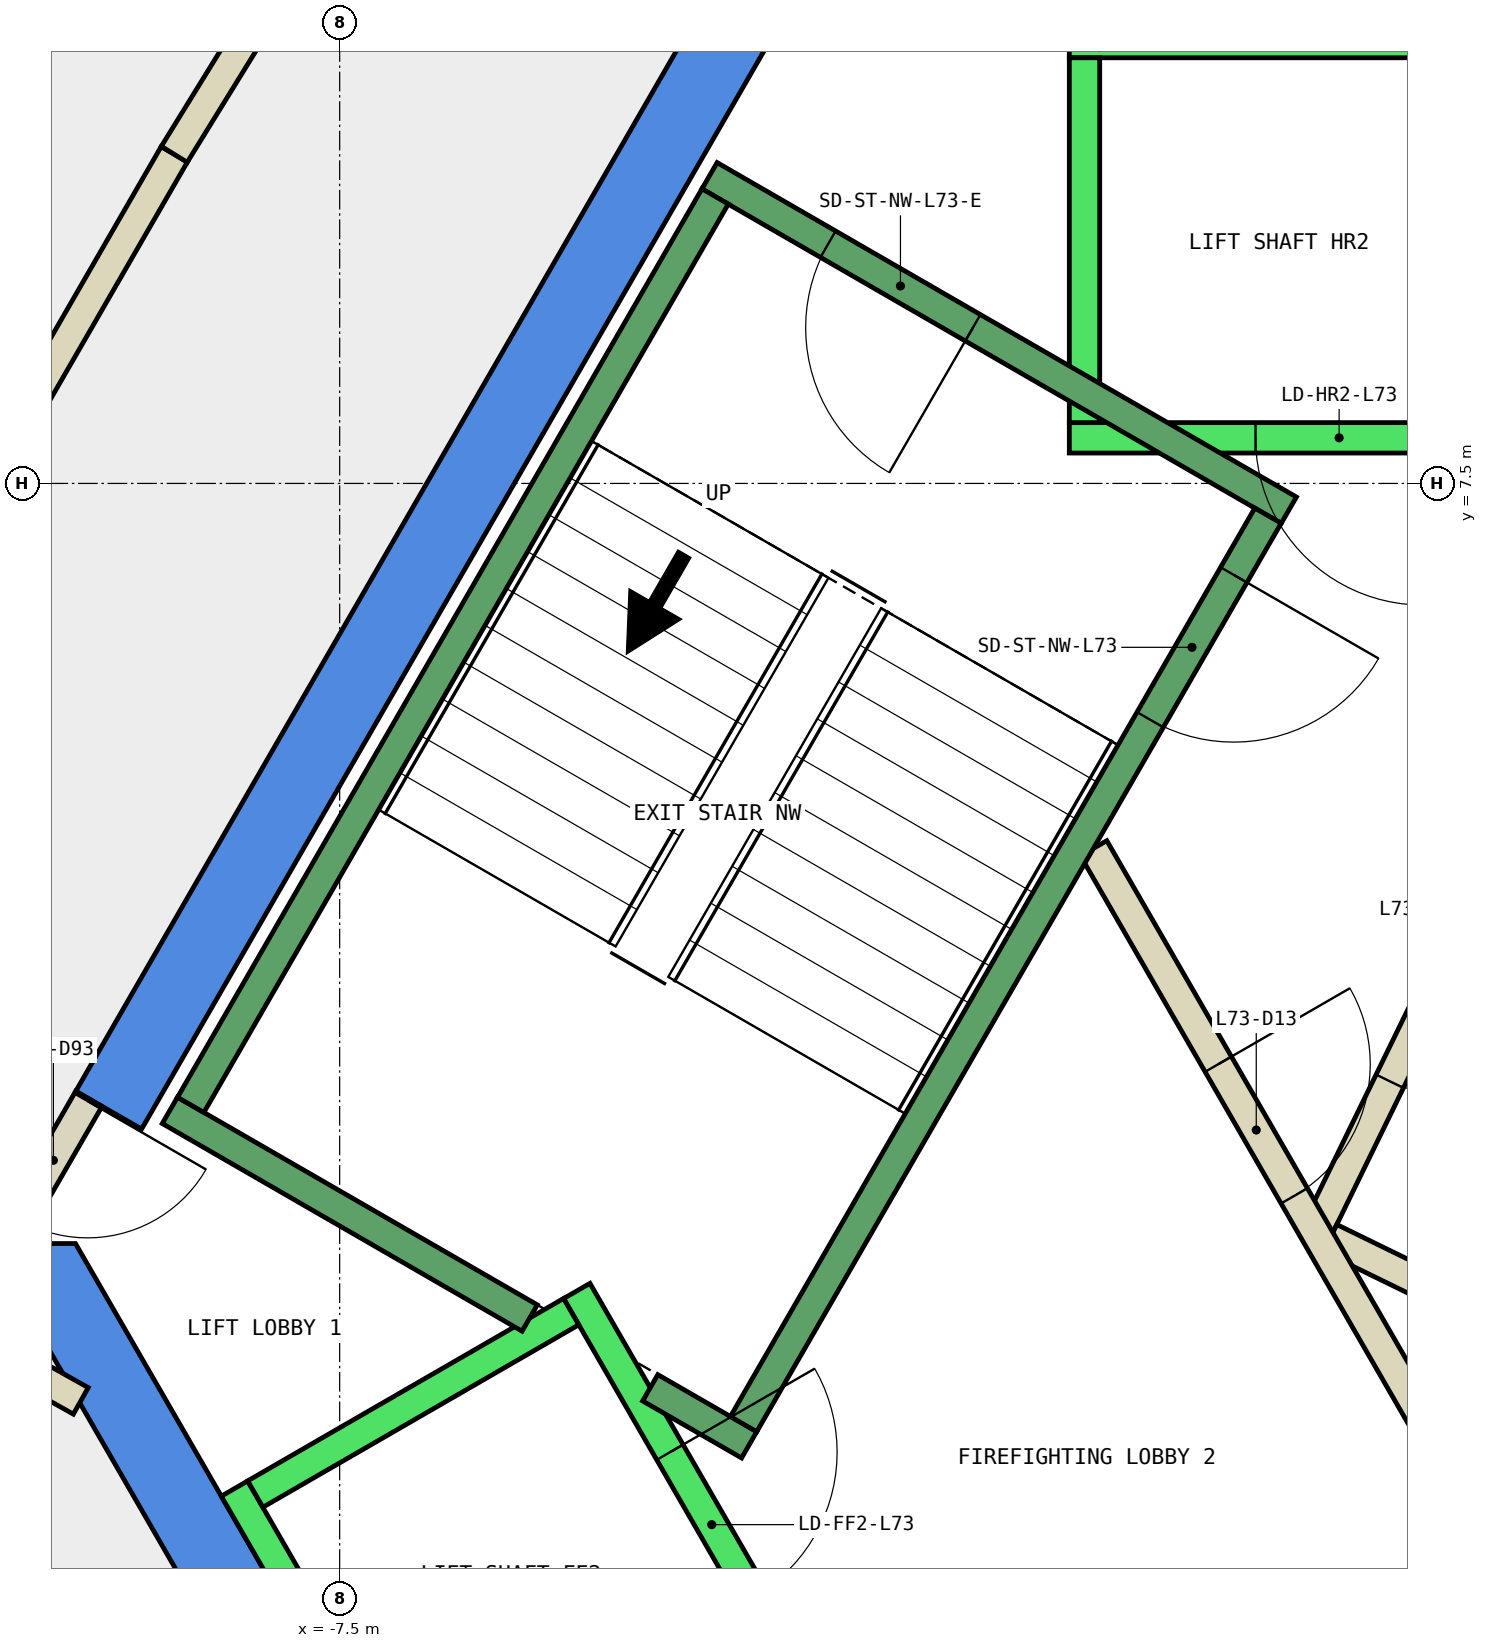
"""IFC4 building model, lengths in metres.
Left out: names, types, materials, properties, quantities, classifications, styles, units other than length and angle.
Written with IfcOpenShell. Run it as: python <this file> out.ifc"""

import sys

from ifc_helpers import new_model, si_unit, direction, frame, frame_2d, origin, place, context, subcontext, project, spatial, polyline, rectangle, outline, extrude, element, fill, save


model = new_model("IFC4")
c1 = context("Model", 3, precision=1e-05, world=origin(), true_north=direction((0.0, 1.0)))
c2 = subcontext(c1, "Body", "Model", "MODEL_VIEW")
j1 = project(units=[si_unit("LENGTHUNIT", "METRE"), si_unit("PLANEANGLEUNIT", "RADIAN")], contexts=[c1])
p1 = place(None, origin())
s1 = spatial("IfcSite", under=j1, at=p1, CompositionType="ELEMENT")
p2 = place(p1, origin())
s2 = spatial("IfcBuilding", under=s1, at=p2, CompositionType="ELEMENT")
p3 = place(p2, frame((0.0, 0.0, 311.6)))
s3 = spatial("IfcBuildingStorey", under=s2, at=p3, CompositionType="ELEMENT", Elevation=311.6)
p4 = place(p3, frame((0.0, 0.0, -0.34)))
e1 = element("IfcWall", 1, at=p4, inside=s3, PredefinedType="SHEAR", context=c2, shape_type="SweptSolid", body=[
    extrude(outline(polyline([(-9.236, 3.502), (-8.803, 3.253), (-4.619, 10.5), (-4.907, 11.0), (-9.236, 3.502)])), origin(), (0.0, 0.0, 1.0), 3.6),
])
p5 = place(p3, frame((0.0, 0.0, -0.34)))
e2 = element("IfcWall", 2, at=p5, inside=s3, PredefinedType="SHEAR", context=c2, shape_type="SweptSolid", body=[
    extrude(outline(polyline([(-9.815, 2.5), (-4.907, -6.0), (-4.619, -5.5), (-9.238, 2.5), (-9.815, 2.5)])), origin(), (0.0, 0.0, 1.0), 3.6),
])
p6 = place(p3, frame((0.285, 5.365, 0.0), z_axis=(0.0, 0.0, 1.0), x_axis=(-0.43840190643, -0.898779043168, 0.0)))
e3 = element("IfcWall", 3, at=p6, inside=s3, PredefinedType="PARTITIONING", context=c2, shape_type="SweptSolid", body=[
    extrude(rectangle(XDim=3.1, YDim=0.2, at=frame_2d((1.55, 0.0))), origin(), (0.0, 0.0, 1.0), 3.26),
])
p7 = place(p6, frame((1.1, 0.0, 0.0)))
e4 = element("IfcOpeningElement", 4, at=p7, cuts=e3, PredefinedType="OPENING", context=c2, shape_type="SweptSolid", body=[
    extrude(rectangle(XDim=0.9, YDim=2.1, at=frame_2d((0.45, 1.05))), frame((0.0, 0.11, 0.0), z_axis=(0.0, -1.0, 0.0), x_axis=(1.0, 0.0, 0.0)), (0.0, 0.0, 1.0), 0.22),
])
p8 = place(p3, frame((-0.984, 2.535, 0.0), z_axis=(0.0, 0.0, 1.0), x_axis=(0.898707583217, -0.438548378025, 0.0)))
e5 = element("IfcWall", 5, at=p8, inside=s3, PredefinedType="PARTITIONING", context=c2, shape_type="SweptSolid", body=[
    extrude(rectangle(XDim=1.774, YDim=0.2, at=frame_2d((0.887, 0.0))), origin(), (0.0, 0.0, 1.0), 3.26),
])
p9 = place(p3, frame((-9.203, 1.465, 0.0), z_axis=(0.0, 0.0, 1.0), x_axis=(-0.872341127106, 0.488897696823, 0.0)))
e6 = element("IfcWall", 6, at=p9, inside=s3, PredefinedType="PARTITIONING", context=c2, shape_type="SweptSolid", body=[
    extrude(rectangle(XDim=1.667, YDim=0.2, at=frame_2d((0.833, 0.0))), origin(), (0.0, 0.0, 1.0), 3.26),
])
p10 = place(p3, frame((-12.701, 2.54, 0.0), z_axis=(0.0, 0.0, 1.0), x_axis=(0.499946799636, 0.86605611685, 0.0)))
e7 = element("IfcWall", 7, at=p10, inside=s3, PredefinedType="PARTITIONING", context=c2, shape_type="SweptSolid", body=[
    extrude(rectangle(XDim=8.227, YDim=0.2, at=frame_2d((4.114, 0.0))), origin(), (0.0, 0.0, 1.0), 3.26),
])
p11 = place(p10, frame((3.613, 0.0, 0.0)))
e8 = element("IfcOpeningElement", 8, at=p11, cuts=e7, PredefinedType="OPENING", context=c2, shape_type="SweptSolid", body=[
    extrude(rectangle(XDim=1.0, YDim=2.1, at=frame_2d((0.5, 1.05))), frame((0.0, 0.11, 0.0), z_axis=(0.0, -1.0, 0.0), x_axis=(1.0, 0.0, 0.0)), (0.0, 0.0, 1.0), 0.22),
])
p12 = place(p3, frame((-8.588, 9.665, 0.0), z_axis=(0.0, 0.0, 1.0), x_axis=(0.525142215688, 0.851014484778, 0.0)))
e9 = element("IfcWall", 9, at=p12, inside=s3, PredefinedType="PARTITIONING", context=c2, shape_type="SweptSolid", body=[
    extrude(rectangle(XDim=7.872, YDim=0.2, at=frame_2d((3.936, 0.0))), origin(), (0.0, 0.0, 1.0), 3.26),
])
p13 = place(p3, frame((-0.982, -1.0, 0.0), z_axis=(0.0, 0.0, 1.0), x_axis=(0.50024047865, 0.865886518847, 0.0)))
e10 = element("IfcWall", 10, at=p13, inside=s3, PredefinedType="PARTITIONING", context=c2, shape_type="SweptSolid", body=[
    extrude(rectangle(XDim=1.863, YDim=0.2, at=frame_2d((0.931, 0.0))), origin(), (0.0, 0.0, 1.0), 3.26),
])
p14 = place(p3, frame((-2.54, 5.1, 0.0), z_axis=(0.0, 0.0, 1.0), x_axis=(0.499925051871, -0.866068670783, 0.0)))
e11 = element("IfcWall", 11, at=p14, inside=s3, PredefinedType="PARTITIONING", context=c2, shape_type="SweptSolid", body=[
    extrude(rectangle(XDim=5.181, YDim=0.2, at=frame_2d((2.59, 0.0))), origin(), (0.0, 0.0, 1.0), 3.26),
])
p15 = place(p14, frame((1.64, 0.0, 0.0)))
e12 = element("IfcOpeningElement", 12, at=p15, cuts=e11, PredefinedType="OPENING", context=c2, shape_type="SweptSolid", body=[
    extrude(rectangle(XDim=1.0, YDim=2.1, at=frame_2d((0.5, 1.05))), frame((0.0, 0.11, 0.0), z_axis=(0.0, -1.0, 0.0), x_axis=(1.0, 0.0, 0.0)), (0.0, 0.0, 1.0), 0.22),
])
p16 = place(p3, frame((-9.15, 3.452, 0.0), z_axis=(0.0, 0.0, 1.0), x_axis=(-0.500079945886, -0.865979242085, 0.0)))
e13 = element("IfcWall", 13, at=p16, inside=s3, PredefinedType="PARTITIONING", context=c2, shape_type="SweptSolid", body=[
    extrude(rectangle(XDim=0.926, YDim=0.2, at=frame_2d((0.463, 0.0))), origin(), (0.0, 0.0, 1.0), 2.4),
])
p17 = place(p16, frame((0.017, 0.0, 0.0)))
e14 = element("IfcOpeningElement", 14, at=p17, cuts=e13, PredefinedType="OPENING", context=c2, shape_type="SweptSolid", body=[
    extrude(rectangle(XDim=0.9, YDim=2.1, at=frame_2d((0.45, 1.05))), frame((0.0, 0.11, 0.0), z_axis=(0.0, -1.0, 0.0), x_axis=(1.0, 0.0, 0.0)), (0.0, 0.0, 1.0), 0.22),
])
p18 = place(p3, frame((2.7, 7.8, 0.0), z_axis=(0.0, 0.0, 1.0), x_axis=(-1.0, 0.0, 0.0)))
e15 = element("IfcWall", 15, at=p18, inside=s3, PredefinedType="STANDARD", context=c2, shape_type="SweptSolid", body=[
    extrude(rectangle(XDim=5.4, YDim=0.2, at=frame_2d((2.7, 0.0))), origin(), (0.0, 0.0, 1.0), 3.26),
])
p19 = place(p18, frame((1.225, 0.0, 0.0)))
e16 = element("IfcOpeningElement", 16, at=p19, cuts=e15, PredefinedType="OPENING", context=c2, shape_type="SweptSolid", body=[
    extrude(rectangle(XDim=1.1, YDim=2.1, at=frame_2d((0.55, 1.05))), frame((0.0, 0.11, 0.0), z_axis=(0.0, -1.0, 0.0), x_axis=(1.0, 0.0, 0.0)), (0.0, 0.0, 1.0), 0.22),
])
p20 = place(p18, frame((3.075, 0.0, 0.0)))
e17 = element("IfcOpeningElement", 17, at=p20, cuts=e15, PredefinedType="OPENING", context=c2, shape_type="SweptSolid", body=[
    extrude(rectangle(XDim=1.1, YDim=2.1, at=frame_2d((0.55, 1.05))), frame((0.0, 0.11, 0.0), z_axis=(0.0, -1.0, 0.0), x_axis=(1.0, 0.0, 0.0)), (0.0, 0.0, 1.0), 0.22),
])
p21 = place(p3, frame((2.7, 10.4, 0.0), z_axis=(0.0, 0.0, 1.0), x_axis=(-1.0, 0.0, 0.0)))
e18 = element("IfcWall", 18, at=p21, inside=s3, PredefinedType="STANDARD", context=c2, shape_type="SweptSolid", body=[
    extrude(rectangle(XDim=5.4, YDim=0.2, at=frame_2d((2.7, 0.0))), origin(), (0.0, 0.0, 1.0), 3.26),
])
p22 = place(p3, frame((-2.6, 7.9, 0.0), z_axis=(0.0, 0.0, 1.0), x_axis=(0.0, 1.0, 0.0)))
e19 = element("IfcWall", 19, at=p22, inside=s3, PredefinedType="STANDARD", context=c2, shape_type="SweptSolid", body=[
    extrude(rectangle(XDim=2.4, YDim=0.2, at=frame_2d((1.2, 0.0))), origin(), (0.0, 0.0, 1.0), 3.26),
])
p23 = place(p3, frame((-5.94, 2.188, 0.0), z_axis=(0.0, 0.0, 1.0), x_axis=(0.500034260056, -0.866005622828, 0.0)))
e20 = element("IfcWall", 20, at=p23, inside=s3, PredefinedType="STANDARD", context=c2, shape_type="SweptSolid", body=[
    extrude(rectangle(XDim=5.399, YDim=0.2, at=frame_2d((2.7, 0.0))), origin(), (0.0, 0.0, 1.0), 3.26),
])
p24 = place(p23, frame((3.075, 0.0, 0.0)))
e21 = element("IfcOpeningElement", 21, at=p24, cuts=e20, PredefinedType="OPENING", context=c2, shape_type="SweptSolid", body=[
    extrude(rectangle(XDim=1.1, YDim=2.1, at=frame_2d((0.55, 1.05))), frame((0.0, 0.11, 0.0), z_axis=(0.0, -1.0, 0.0), x_axis=(1.0, 0.0, 0.0)), (0.0, 0.0, 1.0), 0.22),
])
p25 = place(p23, frame((1.225, 0.0, 0.0)))
e22 = element("IfcOpeningElement", 22, at=p25, cuts=e20, PredefinedType="OPENING", context=c2, shape_type="SweptSolid", body=[
    extrude(rectangle(XDim=1.1, YDim=2.1, at=frame_2d((0.55, 1.05))), frame((0.0, 0.11, 0.0), z_axis=(0.0, -1.0, 0.0), x_axis=(1.0, 0.0, 0.0)), (0.0, 0.0, 1.0), 0.22),
])
p26 = place(p3, frame((-8.192, 0.888, 0.0), z_axis=(0.0, 0.0, 1.0), x_axis=(0.500034260056, -0.866005622828, 0.0)))
e23 = element("IfcWall", 23, at=p26, inside=s3, PredefinedType="STANDARD", context=c2, shape_type="SweptSolid", body=[
    extrude(rectangle(XDim=5.399, YDim=0.2, at=frame_2d((2.7, 0.0))), origin(), (0.0, 0.0, 1.0), 3.26),
])
p27 = place(p3, frame((-5.977, 2.052, 0.0), z_axis=(0.0, 0.0, 1.0), x_axis=(-0.865973769406, -0.500089422704, 0.0)))
e24 = element("IfcWall", 24, at=p27, inside=s3, PredefinedType="STANDARD", context=c2, shape_type="SweptSolid", body=[
    extrude(rectangle(XDim=2.399, YDim=0.2, at=frame_2d((1.2, 0.0))), origin(), (0.0, 0.0, 1.0), 3.26),
])
p28 = place(p3, frame((-1.256, 7.324, 0.0), z_axis=(0.0, 0.0, 1.0), x_axis=(-0.866046073146, 0.499964197906, 0.0)))
e25 = element("IfcWall", 25, at=p28, inside=s3, PredefinedType="STANDARD", context=c2, shape_type="SweptSolid", body=[
    extrude(rectangle(XDim=4.4, YDim=0.2, at=frame_2d((2.2, 0.0))), origin(), (0.0, 0.0, 1.0), 3.26),
])
p29 = place(p28, frame((2.4, 0.0, 0.0)))
e26 = element("IfcOpeningElement", 26, at=p29, cuts=e25, PredefinedType="OPENING", context=c2, shape_type="SweptSolid", body=[
    extrude(rectangle(XDim=1.1, YDim=2.2, at=frame_2d((0.55, 1.1))), frame((0.0, 0.11, 0.0), z_axis=(0.0, -1.0, 0.0), x_axis=(1.0, 0.0, 0.0)), (0.0, 0.0, 1.0), 0.22),
])
p30 = place(p3, frame((-6.25, 2.01, 0.0), z_axis=(0.0, 0.0, 1.0), x_axis=(-0.86611865017, 0.499838457731, 0.0)))
e27 = element("IfcWall", 27, at=p30, inside=s3, PredefinedType="STANDARD", context=c2, shape_type="SweptSolid", body=[
    extrude(rectangle(XDim=2.733, YDim=0.2, at=frame_2d((1.366, 0.0))), origin(), (0.0, 0.0, 1.0), 3.26),
])
p31 = place(p3, frame((-4.806, 1.176, 0.0), z_axis=(0.0, 0.0, 1.0), x_axis=(-0.866558586415, 0.499075361355, 0.0)))
e28 = element("IfcWall", 28, at=p31, inside=s3, PredefinedType="STANDARD", context=c2, shape_type="SweptSolid", body=[
    extrude(rectangle(XDim=0.751, YDim=0.2, at=frame_2d((0.376, 0.0))), origin(), (0.0, 0.0, 1.0), 3.26),
])
p32 = place(p3, frame((-1.393, 7.288, 0.0), z_axis=(0.0, 0.0, 1.0), x_axis=(-0.499963383562, -0.866046543262, 0.0)))
e29 = element("IfcWall", 29, at=p32, inside=s3, PredefinedType="STANDARD", context=c2, shape_type="SweptSolid", body=[
    extrude(rectangle(XDim=6.9, YDim=0.2, at=frame_2d((3.45, 0.0))), origin(), (0.0, 0.0, 1.0), 3.26),
])
p33 = place(p32, frame((0.45, 0.0, 0.0)))
e30 = element("IfcOpeningElement", 30, at=p33, cuts=e29, PredefinedType="OPENING", context=c2, shape_type="SweptSolid", body=[
    extrude(rectangle(XDim=1.1, YDim=2.2, at=frame_2d((0.55, 1.1))), frame((0.0, 0.11, 0.0), z_axis=(0.0, -1.0, 0.0), x_axis=(1.0, 0.0, 0.0)), (0.0, 0.0, 1.0), 0.22),
])
p34 = place(p3, frame((-5.03, 9.388, 0.0), z_axis=(0.0, 0.0, 1.0), x_axis=(-0.499978703459, -0.866037698999, 0.0)))
e31 = element("IfcWall", 31, at=p34, inside=s3, PredefinedType="STANDARD", context=c2, shape_type="SweptSolid", body=[
    extrude(rectangle(XDim=6.9, YDim=0.2, at=frame_2d((3.45, 0.0))), origin(), (0.0, 0.0, 1.0), 3.26),
])
p35 = place(p15, origin())
e32 = element("IfcDoor", 32, at=p35, inside=s3, OperationType="SINGLE_SWING_RIGHT", PredefinedType="DOOR", context=c2, shape_type="SweptSolid", body=[
    extrude(rectangle(XDim=1.0, YDim=2.1, at=frame_2d((0.5, 1.05))), frame((0.0, 0.025, 0.0), z_axis=(0.0, -1.0, 0.0), x_axis=(1.0, 0.0, 0.0)), (0.0, 0.0, 1.0), 0.05),
])
fill(e12, e32)
p36 = place(p7, origin())
e33 = element("IfcDoor", 33, at=p36, inside=s3, OperationType="SINGLE_SWING_RIGHT", PredefinedType="DOOR", context=c2, shape_type="SweptSolid", body=[
    extrude(rectangle(XDim=0.9, YDim=2.1, at=frame_2d((0.45, 1.05))), frame((0.0, 0.025, 0.0), z_axis=(0.0, -1.0, 0.0), x_axis=(1.0, 0.0, 0.0)), (0.0, 0.0, 1.0), 0.05),
])
fill(e4, e33)
p37 = place(p17, origin())
e34 = element("IfcDoor", 34, at=p37, inside=s3, OperationType="SINGLE_SWING_LEFT", PredefinedType="DOOR", context=c2, shape_type="SweptSolid", body=[
    extrude(rectangle(XDim=0.9, YDim=2.1, at=frame_2d((0.45, 1.05))), frame((0.0, 0.025, 0.0), z_axis=(0.0, -1.0, 0.0), x_axis=(1.0, 0.0, 0.0)), (0.0, 0.0, 1.0), 0.05),
])
fill(e14, e34)
p38 = place(p20, origin())
e35 = element("IfcDoor", 35, at=p38, inside=s3, OperationType="SLIDING_TO_LEFT", PredefinedType="DOOR", context=c2, shape_type="SweptSolid", body=[
    extrude(rectangle(XDim=1.1, YDim=2.1, at=frame_2d((0.55, 1.05))), frame((0.0, 0.025, 0.0), z_axis=(0.0, -1.0, 0.0), x_axis=(1.0, 0.0, 0.0)), (0.0, 0.0, 1.0), 0.05),
])
fill(e17, e35)
p39 = place(p25, origin())
e36 = element("IfcDoor", 36, at=p39, inside=s3, OperationType="SLIDING_TO_LEFT", PredefinedType="DOOR", context=c2, shape_type="SweptSolid", body=[
    extrude(rectangle(XDim=1.1, YDim=2.1, at=frame_2d((0.55, 1.05))), frame((0.0, 0.025, 0.0), z_axis=(0.0, -1.0, 0.0), x_axis=(1.0, 0.0, 0.0)), (0.0, 0.0, 1.0), 0.05),
])
fill(e22, e36)
p40 = place(p33, origin())
e37 = element("IfcDoor", 37, at=p40, inside=s3, OperationType="SINGLE_SWING_LEFT", PredefinedType="DOOR", context=c2, shape_type="SweptSolid", body=[
    extrude(rectangle(XDim=1.1, YDim=2.2, at=frame_2d((0.55, 1.1))), frame((0.0, 0.025, 0.0), z_axis=(0.0, -1.0, 0.0), x_axis=(1.0, 0.0, 0.0)), (0.0, 0.0, 1.0), 0.05),
])
fill(e30, e37)
p41 = place(p29, origin())
e38 = element("IfcDoor", 38, at=p41, inside=s3, OperationType="SINGLE_SWING_LEFT", PredefinedType="DOOR", context=c2, shape_type="SweptSolid", body=[
    extrude(rectangle(XDim=1.1, YDim=2.2, at=frame_2d((0.55, 1.1))), frame((0.0, 0.025, 0.0), z_axis=(0.0, -1.0, 0.0), x_axis=(1.0, 0.0, 0.0)), (0.0, 0.0, 1.0), 0.05),
])
fill(e26, e38)
save(model, sys.argv[1])
